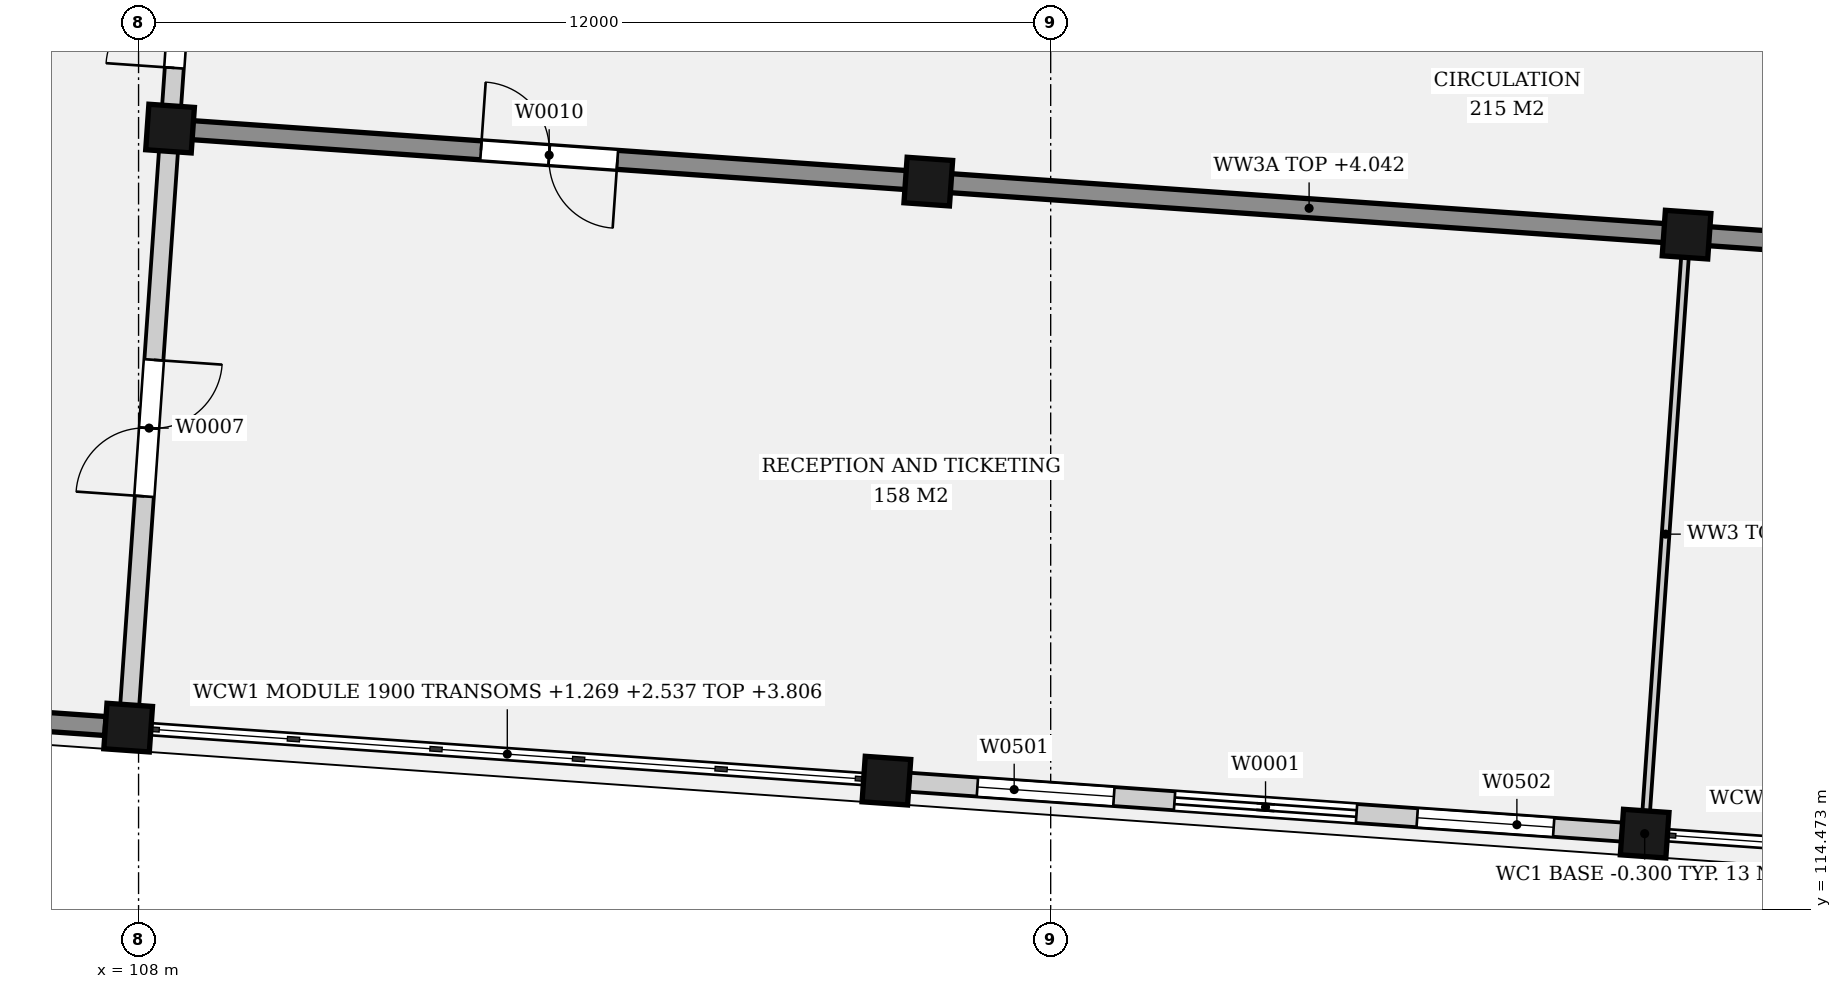
"""IFC4 building model, lengths in metres.
Left out: names, types, materials, properties, quantities, classifications, styles, units other than length and angle.
Written with IfcOpenShell. Run it as: python <this file> out.ifc"""

import sys

from ifc_helpers import new_model, si_unit, direction, frame, frame_2d, origin, origin_2d, place, context, subcontext, project, spatial, rectangle, extrude, element, fill, save


model = new_model("IFC4")
c1 = context("Model", 3, precision=1e-05, world=origin(), true_north=direction((0.0, 1.0)))
c2 = subcontext(c1, "Body", "Model", "MODEL_VIEW")
j1 = project(units=[si_unit("LENGTHUNIT", "METRE"), si_unit("PLANEANGLEUNIT", "RADIAN")], contexts=[c1])
p1 = place(None, origin())
s1 = spatial("IfcSite", under=j1, at=p1, CompositionType="ELEMENT")
p2 = place(p1, origin())
s2 = spatial("IfcBuilding", under=s1, at=p2, CompositionType="ELEMENT")
p3 = place(p2, origin())
s3 = spatial("IfcBuildingStorey", under=s2, at=p3, CompositionType="ELEMENT", Elevation=0.0)
for number, where, z_axis, x_axis in (
    (1, (107.863, 116.865, -0.3), (0.0, 0.0, 1.0), (0.998, -0.07, 0.0)),
    (2, (108.414, 124.746, -0.3), (0.0, 0.0, 1.0), (0.998, -0.07, 0.0)),
    (3, (117.839, 116.167, -0.3), (0.0, 0.0, 1.0), (0.998, -0.07, 0.0)),
    (4, (118.39, 124.048, -0.3), (0.0, 0.0, 1.0), (0.998, -0.07, 0.0)),
    (5, (127.814, 115.47, -0.3), (0.0, 0.0, 1.0), (0.998, -0.07, 0.0)),
    (6, (128.365, 123.351, -0.3), (0.0, 0.0, 1.0), (0.998, -0.07, 0.0)),
):
    element("IfcColumn", number, at=place(p3, frame(where, z_axis=z_axis, x_axis=x_axis)), inside=s3, PredefinedType="COLUMN", context=c2, shape_type="SweptSolid", body=[
        extrude(rectangle(XDim=0.6, YDim=0.6, at=origin_2d()), origin(), (0.0, 0.0, 1.0), 5.3),
    ])
p4 = place(p3, frame((101.13, 117.336, 0.0), z_axis=(0.0, 0.0, 1.0), x_axis=(0.997563842515, -0.069759444574, 0.0)))
e7 = element("IfcWall", 7, at=p4, inside=s3, PredefinedType="SOLIDWALL", context=c2, shape_type="SweptSolid", body=[
    extrude(rectangle(XDim=6.45, YDim=0.25, at=frame_2d((3.225, 0.0))), origin(), (0.0, 0.0, 1.0), 3.806),
])
p5 = place(p3, frame((118.138, 116.146, 0.0), z_axis=(0.0, 0.0, 1.0), x_axis=(0.997565403773, -0.069737114901, 0.0)))
e8 = element("IfcWall", 8, at=p5, inside=s3, PredefinedType="SOLIDWALL", context=c2, shape_type="SweptSolid", body=[
    extrude(rectangle(XDim=9.4, YDim=0.25, at=frame_2d((4.7, 0.0))), origin(), (0.0, 0.0, 1.0), 4.17),
])
p6 = place(p5, frame((3.5, 0.0, 0.0)))
e9 = element("IfcOpeningElement", 9, at=p6, cuts=e8, PredefinedType="OPENING", context=c2, shape_type="SweptSolid", body=[
    extrude(rectangle(XDim=2.4, YDim=2.4, at=frame_2d((1.2, 1.2))), frame((0.0, 0.135, 0.0), z_axis=(0.0, -1.0, 0.0), x_axis=(1.0, 0.0, 0.0)), (0.0, 0.0, 1.0), 0.27),
])
p7 = place(p5, frame((0.9, 0.0, 0.9)))
e10 = element("IfcOpeningElement", 10, at=p7, cuts=e8, PredefinedType="OPENING", context=c2, shape_type="SweptSolid", body=[
    extrude(rectangle(XDim=1.8, YDim=2.4, at=frame_2d((0.9, 1.2))), frame((0.0, 0.135, 0.0), z_axis=(0.0, -1.0, 0.0), x_axis=(1.0, 0.0, 0.0)), (0.0, 0.0, 1.0), 0.27),
])
p8 = place(p5, frame((6.7, 0.0, 0.9)))
e11 = element("IfcOpeningElement", 11, at=p8, cuts=e8, PredefinedType="OPENING", context=c2, shape_type="SweptSolid", body=[
    extrude(rectangle(XDim=1.8, YDim=2.4, at=frame_2d((0.9, 1.2))), frame((0.0, 0.135, 0.0), z_axis=(0.0, -1.0, 0.0), x_axis=(1.0, 0.0, 0.0)), (0.0, 0.0, 1.0), 0.27),
])
p9 = place(p3, frame((107.863, 116.865, 0.0), z_axis=(0.0, 0.0, 1.0), x_axis=(0.069745107516, 0.997564844999, 0.0)))
e12 = element("IfcWall", 12, at=p9, inside=s3, PredefinedType="SOLIDWALL", context=c2, shape_type="SweptSolid", body=[
    extrude(rectangle(XDim=19.2, YDim=0.25, at=frame_2d((9.6, 0.0))), origin(), (0.0, 0.0, 1.0), 3.806),
])
p10 = place(p9, frame((3.05, 0.0, 0.0)))
e13 = element("IfcOpeningElement", 13, at=p10, cuts=e12, PredefinedType="OPENING", context=c2, shape_type="SweptSolid", body=[
    extrude(rectangle(XDim=1.8, YDim=2.1, at=frame_2d((0.9, 1.05))), frame((0.0, 0.135, 0.0), z_axis=(0.0, -1.0, 0.0), x_axis=(1.0, 0.0, 0.0)), (0.0, 0.0, 1.0), 0.27),
])
p11 = place(p9, frame((8.7, 0.0, 0.0)))
e14 = element("IfcOpeningElement", 14, at=p11, cuts=e12, PredefinedType="OPENING", context=c2, shape_type="SweptSolid", body=[
    extrude(rectangle(XDim=1.8, YDim=2.1, at=frame_2d((0.9, 1.05))), frame((0.0, 0.135, 0.0), z_axis=(0.0, -1.0, 0.0), x_axis=(1.0, 0.0, 0.0)), (0.0, 0.0, 1.0), 0.27),
])
p12 = place(p9, frame((14.75, 0.0, 0.0)))
e15 = element("IfcOpeningElement", 15, at=p12, cuts=e12, PredefinedType="OPENING", context=c2, shape_type="SweptSolid", body=[
    extrude(rectangle(XDim=1.0, YDim=2.1, at=frame_2d((0.5, 1.05))), frame((0.0, 0.135, 0.0), z_axis=(0.0, -1.0, 0.0), x_axis=(1.0, 0.0, 0.0)), (0.0, 0.0, 1.0), 0.27),
])
p13 = place(p3, frame((127.814, 115.47, 0.0), z_axis=(0.0, 0.0, 1.0), x_axis=(0.069751320509, 0.997564410596, 0.0)))
e16 = element("IfcWall", 16, at=p13, inside=s3, PredefinedType="PARTITIONING", context=c2, shape_type="SweptSolid", body=[
    extrude(rectangle(XDim=7.9, YDim=0.1, at=frame_2d((3.95, 0.0))), origin(), (0.0, 0.0, 1.0), 4.17),
])
p14 = place(p3, frame((108.414, 124.746, 0.0), z_axis=(0.0, 0.0, 1.0), x_axis=(0.99756419748, -0.069754368369, 0.0)))
e17 = element("IfcWall", 17, at=p14, inside=s3, PredefinedType="PARTITIONING", context=c2, shape_type="SweptSolid", body=[
    extrude(rectangle(XDim=35.0, YDim=0.25, at=frame_2d((17.5, 0.0))), origin(), (0.0, 0.0, 1.0), 4.042),
])
p15 = place(p14, frame((4.1, 0.0, 0.0)))
e18 = element("IfcOpeningElement", 18, at=p15, cuts=e17, PredefinedType="OPENING", context=c2, shape_type="SweptSolid", body=[
    extrude(rectangle(XDim=1.8, YDim=2.1, at=frame_2d((0.9, 1.05))), frame((0.0, 0.135, 0.0), z_axis=(0.0, -1.0, 0.0), x_axis=(1.0, 0.0, 0.0)), (0.0, 0.0, 1.0), 0.27),
])
p16 = place(p14, frame((26.6, 0.0, 0.0)))
e19 = element("IfcOpeningElement", 19, at=p16, cuts=e17, PredefinedType="OPENING", context=c2, shape_type="SweptSolid", body=[
    extrude(rectangle(XDim=1.8, YDim=2.1, at=frame_2d((0.9, 1.05))), frame((0.0, 0.135, 0.0), z_axis=(0.0, -1.0, 0.0), x_axis=(1.0, 0.0, 0.0)), (0.0, 0.0, 1.0), 0.27),
])
p17 = place(p6, origin())
e20 = element("IfcDoor", 20, at=p17, inside=s3, OperationType="DOUBLE_DOOR_SLIDING", PredefinedType="DOOR", context=c2, shape_type="SweptSolid", body=[
    extrude(rectangle(XDim=2.4, YDim=2.4, at=frame_2d((1.2, 1.2))), frame((0.0, 0.025, 0.0), z_axis=(0.0, -1.0, 0.0), x_axis=(1.0, 0.0, 0.0)), (0.0, 0.0, 1.0), 0.05),
])
fill(e9, e20)
p18 = place(p7, origin())
e21 = element("IfcWindow", 21, at=p18, inside=s3, PartitioningType="SINGLE_PANEL", PredefinedType="WINDOW", context=c2, shape_type="SweptSolid", body=[
    extrude(rectangle(XDim=1.8, YDim=2.4, at=frame_2d((0.9, 1.2))), frame((0.0, 0.03, 0.0), z_axis=(0.0, -1.0, 0.0), x_axis=(1.0, 0.0, 0.0)), (0.0, 0.0, 1.0), 0.06),
])
fill(e10, e21)
p19 = place(p8, origin())
e22 = element("IfcWindow", 22, at=p19, inside=s3, PartitioningType="SINGLE_PANEL", PredefinedType="WINDOW", context=c2, shape_type="SweptSolid", body=[
    extrude(rectangle(XDim=1.8, YDim=2.4, at=frame_2d((0.9, 1.2))), frame((0.0, 0.03, 0.0), z_axis=(0.0, -1.0, 0.0), x_axis=(1.0, 0.0, 0.0)), (0.0, 0.0, 1.0), 0.06),
])
fill(e11, e22)
p20 = place(p10, origin())
e23 = element("IfcDoor", 23, at=p20, inside=s3, OperationType="DOUBLE_DOOR_SINGLE_SWING", PredefinedType="DOOR", context=c2, shape_type="SweptSolid", body=[
    extrude(rectangle(XDim=1.8, YDim=2.1, at=frame_2d((0.9, 1.05))), frame((0.0, 0.025, 0.0), z_axis=(0.0, -1.0, 0.0), x_axis=(1.0, 0.0, 0.0)), (0.0, 0.0, 1.0), 0.05),
])
fill(e13, e23)
p21 = place(p11, origin())
e24 = element("IfcDoor", 24, at=p21, inside=s3, OperationType="DOUBLE_DOOR_SINGLE_SWING", PredefinedType="DOOR", context=c2, shape_type="SweptSolid", body=[
    extrude(rectangle(XDim=1.8, YDim=2.1, at=frame_2d((0.9, 1.05))), frame((0.0, 0.025, 0.0), z_axis=(0.0, -1.0, 0.0), x_axis=(1.0, 0.0, 0.0)), (0.0, 0.0, 1.0), 0.05),
])
fill(e14, e24)
p22 = place(p15, origin())
e25 = element("IfcDoor", 25, at=p22, inside=s3, OperationType="DOUBLE_DOOR_SINGLE_SWING", PredefinedType="DOOR", context=c2, shape_type="SweptSolid", body=[
    extrude(rectangle(XDim=1.8, YDim=2.1, at=frame_2d((0.9, 1.05))), frame((0.0, 0.025, 0.0), z_axis=(0.0, -1.0, 0.0), x_axis=(1.0, 0.0, 0.0)), (0.0, 0.0, 1.0), 0.05),
])
fill(e18, e25)
save(model, sys.argv[1])
